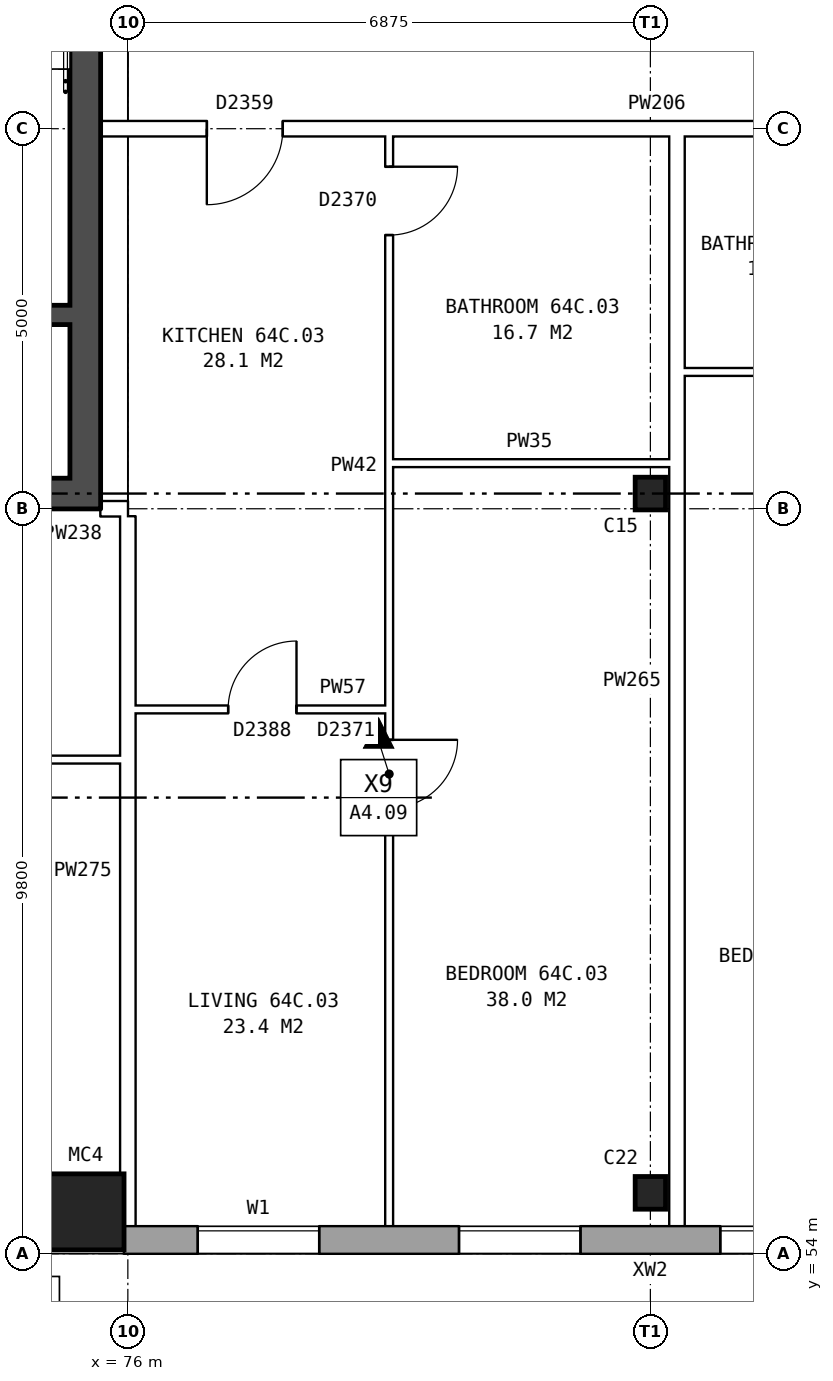
"""IFC4 building model, lengths in metres.
Left out: names, types, materials, properties, quantities, classifications, styles, units other than length and angle.
Written with IfcOpenShell. Run it as: python <this file> out.ifc"""

import sys

from ifc_helpers import new_model, si_unit, direction, frame, frame_2d, origin, origin_2d, place, context, subcontext, project, spatial, rectangle, hollow_rectangle, i_section, extrude, element, fill, save


model = new_model("IFC4")
c1 = context("Model", 3, precision=1e-05, world=origin(), true_north=direction((0.0, 1.0)))
c2 = subcontext(c1, "Body", "Model", "MODEL_VIEW")
j1 = project(units=[si_unit("LENGTHUNIT", "METRE"), si_unit("PLANEANGLEUNIT", "RADIAN")], contexts=[c1])
p1 = place(None, origin())
s1 = spatial("IfcSite", under=j1, at=p1, CompositionType="ELEMENT")
p2 = place(p1, origin())
s2 = spatial("IfcBuilding", under=s1, at=p2, CompositionType="ELEMENT")
p3 = place(p2, frame((0.0, 0.0, 227.6)))
s3 = spatial("IfcBuildingStorey", under=s2, at=p3, CompositionType="ELEMENT", Elevation=227.6)
p4 = place(p3, frame((75.45, 54.55, 0.0), z_axis=(0.0, 0.0, 1.0), x_axis=(1.0, 0.0, 0.0)))
e1 = element("IfcColumn", 1, at=p4, inside=s3, PredefinedType="COLUMN", context=c2, shape_type="SweptSolid", body=[
    extrude(hollow_rectangle(XDim=1.0, YDim=1.0, WallThickness=0.055, at=origin_2d()), origin(), (0.0, 0.0, 1.0), 3.1),
])
for number, where, z_axis, x_axis in (
    (2, (82.875, 54.8, 0.0), (0.0, 0.0, 1.0), (1.0, 0.0, 0.0)),
    (3, (82.875, 64.0, 0.0), (0.0, 0.0, 1.0), (1.0, 0.0, 0.0)),
):
    element("IfcColumn", number, at=place(p3, frame(where, z_axis=z_axis, x_axis=x_axis)), inside=s3, PredefinedType="COLUMN", context=c2, shape_type="SweptSolid", body=[
        extrude(i_section(OverallWidth=0.4, OverallDepth=0.43, WebThickness=0.04, FlangeThickness=0.04, at=origin_2d()), origin(), (0.0, 0.0, 1.0), 2.85),
    ])
p5 = place(p3, frame((75.95, 54.18, 0.0), z_axis=(0.0, 0.0, 1.0), x_axis=(1.0, 0.0, 0.0)))
e4 = element("IfcWall", 4, at=p5, inside=s3, PredefinedType="STANDARD", context=c2, shape_type="SweptSolid", body=[
    extrude(rectangle(XDim=55.1, YDim=0.36, at=frame_2d((27.55, 0.0))), origin(), (0.0, 0.0, 1.0), 2.85),
])
p6 = place(p5, frame((0.969, 0.0, 0.8)))
e5 = element("IfcOpeningElement", 5, at=p6, cuts=e4, PredefinedType="OPENING", context=c2, shape_type="SweptSolid", body=[
    extrude(rectangle(XDim=1.6, YDim=1.8, at=frame_2d((0.8, 0.9))), frame((0.0, 0.19, 0.0), z_axis=(0.0, -1.0, 0.0), x_axis=(1.0, 0.0, 0.0)), (0.0, 0.0, 1.0), 0.38),
])
p7 = place(p5, frame((4.406, 0.0, 0.8)))
e6 = element("IfcOpeningElement", 6, at=p7, cuts=e4, PredefinedType="OPENING", context=c2, shape_type="SweptSolid", body=[
    extrude(rectangle(XDim=1.6, YDim=1.8, at=frame_2d((0.8, 0.9))), frame((0.0, 0.19, 0.0), z_axis=(0.0, -1.0, 0.0), x_axis=(1.0, 0.0, 0.0)), (0.0, 0.0, 1.0), 0.38),
])
p8 = place(p5, frame((7.844, 0.0, 0.8)))
e7 = element("IfcOpeningElement", 7, at=p8, cuts=e4, PredefinedType="OPENING", context=c2, shape_type="SweptSolid", body=[
    extrude(rectangle(XDim=1.6, YDim=1.8, at=frame_2d((0.8, 0.9))), frame((0.0, 0.19, 0.0), z_axis=(0.0, -1.0, 0.0), x_axis=(1.0, 0.0, 0.0)), (0.0, 0.0, 1.0), 0.38),
])
p9 = place(p5, frame((11.281, 0.0, 0.8)))
e8 = element("IfcOpeningElement", 8, at=p9, cuts=e4, PredefinedType="OPENING", context=c2, shape_type="SweptSolid", body=[
    extrude(rectangle(XDim=1.6, YDim=1.8, at=frame_2d((0.8, 0.9))), frame((0.0, 0.19, 0.0), z_axis=(0.0, -1.0, 0.0), x_axis=(1.0, 0.0, 0.0)), (0.0, 0.0, 1.0), 0.38),
])
p10 = place(p5, frame((14.719, 0.0, 0.8)))
e9 = element("IfcOpeningElement", 9, at=p10, cuts=e4, PredefinedType="OPENING", context=c2, shape_type="SweptSolid", body=[
    extrude(rectangle(XDim=1.6, YDim=1.8, at=frame_2d((0.8, 0.9))), frame((0.0, 0.19, 0.0), z_axis=(0.0, -1.0, 0.0), x_axis=(1.0, 0.0, 0.0)), (0.0, 0.0, 1.0), 0.38),
])
p11 = place(p5, frame((18.156, 0.0, 0.8)))
e10 = element("IfcOpeningElement", 10, at=p11, cuts=e4, PredefinedType="OPENING", context=c2, shape_type="SweptSolid", body=[
    extrude(rectangle(XDim=1.6, YDim=1.8, at=frame_2d((0.8, 0.9))), frame((0.0, 0.19, 0.0), z_axis=(0.0, -1.0, 0.0), x_axis=(1.0, 0.0, 0.0)), (0.0, 0.0, 1.0), 0.38),
])
p12 = place(p5, frame((21.594, 0.0, 0.8)))
e11 = element("IfcOpeningElement", 11, at=p12, cuts=e4, PredefinedType="OPENING", context=c2, shape_type="SweptSolid", body=[
    extrude(rectangle(XDim=1.6, YDim=1.8, at=frame_2d((0.8, 0.9))), frame((0.0, 0.19, 0.0), z_axis=(0.0, -1.0, 0.0), x_axis=(1.0, 0.0, 0.0)), (0.0, 0.0, 1.0), 0.38),
])
p13 = place(p5, frame((25.031, 0.0, 0.8)))
e12 = element("IfcOpeningElement", 12, at=p13, cuts=e4, PredefinedType="OPENING", context=c2, shape_type="SweptSolid", body=[
    extrude(rectangle(XDim=1.6, YDim=1.8, at=frame_2d((0.8, 0.9))), frame((0.0, 0.19, 0.0), z_axis=(0.0, -1.0, 0.0), x_axis=(1.0, 0.0, 0.0)), (0.0, 0.0, 1.0), 0.38),
])
p14 = place(p5, frame((28.469, 0.0, 0.8)))
e13 = element("IfcOpeningElement", 13, at=p14, cuts=e4, PredefinedType="OPENING", context=c2, shape_type="SweptSolid", body=[
    extrude(rectangle(XDim=1.6, YDim=1.8, at=frame_2d((0.8, 0.9))), frame((0.0, 0.19, 0.0), z_axis=(0.0, -1.0, 0.0), x_axis=(1.0, 0.0, 0.0)), (0.0, 0.0, 1.0), 0.38),
])
p15 = place(p5, frame((31.906, 0.0, 0.8)))
e14 = element("IfcOpeningElement", 14, at=p15, cuts=e4, PredefinedType="OPENING", context=c2, shape_type="SweptSolid", body=[
    extrude(rectangle(XDim=1.6, YDim=1.8, at=frame_2d((0.8, 0.9))), frame((0.0, 0.19, 0.0), z_axis=(0.0, -1.0, 0.0), x_axis=(1.0, 0.0, 0.0)), (0.0, 0.0, 1.0), 0.38),
])
p16 = place(p5, frame((35.344, 0.0, 0.8)))
e15 = element("IfcOpeningElement", 15, at=p16, cuts=e4, PredefinedType="OPENING", context=c2, shape_type="SweptSolid", body=[
    extrude(rectangle(XDim=1.6, YDim=1.8, at=frame_2d((0.8, 0.9))), frame((0.0, 0.19, 0.0), z_axis=(0.0, -1.0, 0.0), x_axis=(1.0, 0.0, 0.0)), (0.0, 0.0, 1.0), 0.38),
])
p17 = place(p5, frame((38.781, 0.0, 0.8)))
e16 = element("IfcOpeningElement", 16, at=p17, cuts=e4, PredefinedType="OPENING", context=c2, shape_type="SweptSolid", body=[
    extrude(rectangle(XDim=1.6, YDim=1.8, at=frame_2d((0.8, 0.9))), frame((0.0, 0.19, 0.0), z_axis=(0.0, -1.0, 0.0), x_axis=(1.0, 0.0, 0.0)), (0.0, 0.0, 1.0), 0.38),
])
p18 = place(p5, frame((42.219, 0.0, 0.8)))
e17 = element("IfcOpeningElement", 17, at=p18, cuts=e4, PredefinedType="OPENING", context=c2, shape_type="SweptSolid", body=[
    extrude(rectangle(XDim=1.6, YDim=1.8, at=frame_2d((0.8, 0.9))), frame((0.0, 0.19, 0.0), z_axis=(0.0, -1.0, 0.0), x_axis=(1.0, 0.0, 0.0)), (0.0, 0.0, 1.0), 0.38),
])
p19 = place(p5, frame((45.656, 0.0, 0.8)))
e18 = element("IfcOpeningElement", 18, at=p19, cuts=e4, PredefinedType="OPENING", context=c2, shape_type="SweptSolid", body=[
    extrude(rectangle(XDim=1.6, YDim=1.8, at=frame_2d((0.8, 0.9))), frame((0.0, 0.19, 0.0), z_axis=(0.0, -1.0, 0.0), x_axis=(1.0, 0.0, 0.0)), (0.0, 0.0, 1.0), 0.38),
])
p20 = place(p5, frame((49.094, 0.0, 0.8)))
e19 = element("IfcOpeningElement", 19, at=p20, cuts=e4, PredefinedType="OPENING", context=c2, shape_type="SweptSolid", body=[
    extrude(rectangle(XDim=1.6, YDim=1.8, at=frame_2d((0.8, 0.9))), frame((0.0, 0.19, 0.0), z_axis=(0.0, -1.0, 0.0), x_axis=(1.0, 0.0, 0.0)), (0.0, 0.0, 1.0), 0.38),
])
p21 = place(p5, frame((52.531, 0.0, 0.8)))
e20 = element("IfcOpeningElement", 20, at=p21, cuts=e4, PredefinedType="OPENING", context=c2, shape_type="SweptSolid", body=[
    extrude(rectangle(XDim=1.6, YDim=1.8, at=frame_2d((0.8, 0.9))), frame((0.0, 0.19, 0.0), z_axis=(0.0, -1.0, 0.0), x_axis=(1.0, 0.0, 0.0)), (0.0, 0.0, 1.0), 0.38),
])
p22 = place(p3, frame((75.44, 63.8, 0.0), z_axis=(0.0, 0.0, 1.0), x_axis=(0.0, 1.0, 0.0)))
e21 = element("IfcWall", 21, at=p22, inside=s3, PredefinedType="SHEAR", context=c2, shape_type="SweptSolid", body=[
    extrude(rectangle(XDim=12.4, YDim=0.4, at=frame_2d((6.2, 0.0))), origin(), (0.0, 0.0, 1.0), 2.85),
])
p23 = place(p22, frame((9.8, 0.0, 0.0)))
e22 = element("IfcOpeningElement", 22, at=p23, cuts=e21, PredefinedType="OPENING", context=c2, shape_type="SweptSolid", body=[
    extrude(rectangle(XDim=1.1, YDim=2.1, at=frame_2d((0.55, 1.05))), frame((0.0, 0.21, 0.0), z_axis=(0.0, -1.0, 0.0), x_axis=(1.0, 0.0, 0.0)), (0.0, 0.0, 1.0), 0.42),
])
p24 = place(p3, frame((67.04, 64.0, 0.0), z_axis=(0.0, 0.0, 1.0), x_axis=(1.0, 0.0, 0.0)))
e23 = element("IfcWall", 23, at=p24, inside=s3, PredefinedType="SHEAR", context=c2, shape_type="SweptSolid", body=[
    extrude(rectangle(XDim=8.2, YDim=0.4, at=frame_2d((4.1, 0.0))), origin(), (0.0, 0.0, 1.0), 2.85),
])
p25 = place(p3, frame((72.165, 66.35, 0.0), z_axis=(0.0, 0.0, 1.0), x_axis=(1.0, 0.0, 0.0)))
e24 = element("IfcWall", 24, at=p25, inside=s3, PredefinedType="SHEAR", context=c2, shape_type="SweptSolid", body=[
    extrude(rectangle(XDim=3.075, YDim=0.25, at=frame_2d((1.538, 0.0))), origin(), (0.0, 0.0, 1.0), 2.85),
])
p26 = place(p3, frame((70.1, 60.5, 0.0), z_axis=(0.0, 0.0, 1.0), x_axis=(1.0, 0.0, 0.0)))
e25 = element("IfcWall", 25, at=p26, inside=s3, PredefinedType="PARTITIONING", context=c2, shape_type="SweptSolid", body=[
    extrude(rectangle(XDim=5.8, YDim=0.1, at=frame_2d((2.9, 0.0))), origin(), (0.0, 0.0, 1.0), 2.85),
])
p27 = place(p3, frame((76.1, 61.16, 0.0), z_axis=(0.0, 0.0, 1.0), x_axis=(1.0, 0.0, 0.0)))
e26 = element("IfcWall", 26, at=p27, inside=s3, PredefinedType="PARTITIONING", context=c2, shape_type="SweptSolid", body=[
    extrude(rectangle(XDim=3.338, YDim=0.1, at=frame_2d((1.669, 0.0))), origin(), (0.0, 0.0, 1.0), 2.85),
])
p28 = place(p27, frame((1.219, 0.0, 0.0)))
e27 = element("IfcOpeningElement", 27, at=p28, cuts=e26, PredefinedType="OPENING", context=c2, shape_type="SweptSolid", body=[
    extrude(rectangle(XDim=0.9, YDim=2.1, at=frame_2d((0.45, 1.05))), frame((0.0, 0.06, 0.0), z_axis=(0.0, -1.0, 0.0), x_axis=(1.0, 0.0, 0.0)), (0.0, 0.0, 1.0), 0.12),
])
p29 = place(p3, frame((75.64, 63.8, 0.0), z_axis=(0.0, 0.0, 1.0), x_axis=(1.0, 0.0, 0.0)))
e28 = element("IfcWall", 28, at=p29, inside=s3, PredefinedType="PARTITIONING", context=c2, shape_type="SweptSolid", body=[
    extrude(rectangle(XDim=0.36, YDim=0.2, at=frame_2d((0.18, 0.0))), origin(), (0.0, 0.0, 1.0), 2.85),
])
p30 = place(p3, frame((79.438, 64.4, 0.0), z_axis=(0.0, 0.0, 1.0), x_axis=(1.0, 0.0, 0.0)))
e29 = element("IfcWall", 29, at=p30, inside=s3, PredefinedType="PARTITIONING", context=c2, shape_type="SweptSolid", body=[
    extrude(rectangle(XDim=3.687, YDim=0.1, at=frame_2d((1.844, 0.0))), origin(), (0.0, 0.0, 1.0), 2.85),
])
p31 = place(p3, frame((83.325, 65.6, 0.0), z_axis=(0.0, 0.0, 1.0), x_axis=(1.0, 0.0, 0.0)))
e30 = element("IfcWall", 30, at=p31, inside=s3, PredefinedType="PARTITIONING", context=c2, shape_type="SweptSolid", body=[
    extrude(rectangle(XDim=3.337, YDim=0.1, at=frame_2d((1.668, 0.0))), origin(), (0.0, 0.0, 1.0), 2.85),
])
p32 = place(p3, frame((75.64, 68.8, 0.0), z_axis=(0.0, 0.0, 1.0), x_axis=(1.0, 0.0, 0.0)))
e31 = element("IfcWall", 31, at=p32, inside=s3, PredefinedType="PARTITIONING", context=c2, shape_type="SweptSolid", body=[
    extrude(rectangle(XDim=55.72, YDim=0.2, at=frame_2d((27.86, 0.0))), origin(), (0.0, 0.0, 1.0), 2.85),
])
p33 = place(p32, frame((1.399, 0.0, 0.0)))
e32 = element("IfcOpeningElement", 32, at=p33, cuts=e31, PredefinedType="OPENING", context=c2, shape_type="SweptSolid", body=[
    extrude(rectangle(XDim=1.0, YDim=2.1, at=frame_2d((0.5, 1.05))), frame((0.0, 0.11, 0.0), z_axis=(0.0, -1.0, 0.0), x_axis=(1.0, 0.0, 0.0)), (0.0, 0.0, 1.0), 0.22),
])
p34 = place(p32, frame((12.241, 0.0, 0.0)))
e33 = element("IfcOpeningElement", 33, at=p34, cuts=e31, PredefinedType="OPENING", context=c2, shape_type="SweptSolid", body=[
    extrude(rectangle(XDim=1.0, YDim=2.1, at=frame_2d((0.5, 1.05))), frame((0.0, 0.11, 0.0), z_axis=(0.0, -1.0, 0.0), x_axis=(1.0, 0.0, 0.0)), (0.0, 0.0, 1.0), 0.22),
])
p35 = place(p32, frame((22.553, 0.0, 0.0)))
e34 = element("IfcOpeningElement", 34, at=p35, cuts=e31, PredefinedType="OPENING", context=c2, shape_type="SweptSolid", body=[
    extrude(rectangle(XDim=1.0, YDim=2.1, at=frame_2d((0.5, 1.05))), frame((0.0, 0.11, 0.0), z_axis=(0.0, -1.0, 0.0), x_axis=(1.0, 0.0, 0.0)), (0.0, 0.0, 1.0), 0.22),
])
p36 = place(p32, frame((32.866, 0.0, 0.0)))
e35 = element("IfcOpeningElement", 35, at=p36, cuts=e31, PredefinedType="OPENING", context=c2, shape_type="SweptSolid", body=[
    extrude(rectangle(XDim=1.0, YDim=2.1, at=frame_2d((0.5, 1.05))), frame((0.0, 0.11, 0.0), z_axis=(0.0, -1.0, 0.0), x_axis=(1.0, 0.0, 0.0)), (0.0, 0.0, 1.0), 0.22),
])
p37 = place(p32, frame((36.303, 0.0, 0.0)))
e36 = element("IfcOpeningElement", 36, at=p37, cuts=e31, PredefinedType="OPENING", context=c2, shape_type="SweptSolid", body=[
    extrude(rectangle(XDim=1.0, YDim=2.1, at=frame_2d((0.5, 1.05))), frame((0.0, 0.11, 0.0), z_axis=(0.0, -1.0, 0.0), x_axis=(1.0, 0.0, 0.0)), (0.0, 0.0, 1.0), 0.22),
])
p38 = place(p32, frame((46.616, 0.0, 0.0)))
e37 = element("IfcOpeningElement", 37, at=p38, cuts=e31, PredefinedType="OPENING", context=c2, shape_type="SweptSolid", body=[
    extrude(rectangle(XDim=1.0, YDim=2.1, at=frame_2d((0.5, 1.05))), frame((0.0, 0.11, 0.0), z_axis=(0.0, -1.0, 0.0), x_axis=(1.0, 0.0, 0.0)), (0.0, 0.0, 1.0), 0.22),
])
p39 = place(p32, frame((50.053, 0.0, 0.0)))
e38 = element("IfcOpeningElement", 38, at=p39, cuts=e31, PredefinedType="OPENING", context=c2, shape_type="SweptSolid", body=[
    extrude(rectangle(XDim=1.0, YDim=2.1, at=frame_2d((0.5, 1.05))), frame((0.0, 0.11, 0.0), z_axis=(0.0, -1.0, 0.0), x_axis=(1.0, 0.0, 0.0)), (0.0, 0.0, 1.0), 0.22),
])
p40 = place(p3, frame((76.0, 54.36, 0.0), z_axis=(0.0, 0.0, 1.0), x_axis=(0.0, 1.0, 0.0)))
e39 = element("IfcWall", 39, at=p40, inside=s3, PredefinedType="PARTITIONING", context=c2, shape_type="SweptSolid", body=[
    extrude(rectangle(XDim=9.34, YDim=0.2, at=frame_2d((4.67, 0.0))), origin(), (0.0, 0.0, 1.0), 2.85),
])
p41 = place(p3, frame((79.438, 54.36, 0.0), z_axis=(0.0, 0.0, 1.0), x_axis=(0.0, 1.0, 0.0)))
e40 = element("IfcWall", 40, at=p41, inside=s3, PredefinedType="PARTITIONING", context=c2, shape_type="SweptSolid", body=[
    extrude(rectangle(XDim=14.34, YDim=0.1, at=frame_2d((7.17, 0.0))), origin(), (0.0, 0.0, 1.0), 2.85),
])
p42 = place(p41, frame((5.5, 0.0, 0.0)))
e41 = element("IfcOpeningElement", 41, at=p42, cuts=e40, PredefinedType="OPENING", context=c2, shape_type="SweptSolid", body=[
    extrude(rectangle(XDim=0.9, YDim=2.1, at=frame_2d((0.45, 1.05))), frame((0.0, 0.06, 0.0), z_axis=(0.0, -1.0, 0.0), x_axis=(1.0, 0.0, 0.0)), (0.0, 0.0, 1.0), 0.12),
])
p43 = place(p41, frame((13.04, 0.0, 0.0)))
e42 = element("IfcOpeningElement", 42, at=p43, cuts=e40, PredefinedType="OPENING", context=c2, shape_type="SweptSolid", body=[
    extrude(rectangle(XDim=0.9, YDim=2.1, at=frame_2d((0.45, 1.05))), frame((0.0, 0.06, 0.0), z_axis=(0.0, -1.0, 0.0), x_axis=(1.0, 0.0, 0.0)), (0.0, 0.0, 1.0), 0.12),
])
p44 = place(p3, frame((83.225, 54.36, 0.0), z_axis=(0.0, 0.0, 1.0), x_axis=(0.0, 1.0, 0.0)))
e43 = element("IfcWall", 43, at=p44, inside=s3, PredefinedType="PARTITIONING", context=c2, shape_type="SweptSolid", body=[
    extrude(rectangle(XDim=14.34, YDim=0.2, at=frame_2d((7.17, 0.0))), origin(), (0.0, 0.0, 1.0), 2.85),
])
p45 = place(p6, origin())
e44 = element("IfcWindow", 44, at=p45, inside=s3, PartitioningType="SINGLE_PANEL", PredefinedType="WINDOW", context=c2, shape_type="SweptSolid", body=[
    extrude(rectangle(XDim=1.6, YDim=1.8, at=frame_2d((0.8, 0.9))), frame((0.0, 0.15, 0.0), z_axis=(0.0, -1.0, 0.0), x_axis=(1.0, 0.0, 0.0)), (0.0, 0.0, 1.0), 0.06),
])
fill(e5, e44)
p46 = place(p7, origin())
e45 = element("IfcWindow", 45, at=p46, inside=s3, PartitioningType="SINGLE_PANEL", PredefinedType="WINDOW", context=c2, shape_type="SweptSolid", body=[
    extrude(rectangle(XDim=1.6, YDim=1.8, at=frame_2d((0.8, 0.9))), frame((0.0, 0.15, 0.0), z_axis=(0.0, -1.0, 0.0), x_axis=(1.0, 0.0, 0.0)), (0.0, 0.0, 1.0), 0.06),
])
fill(e6, e45)
p47 = place(p8, origin())
e46 = element("IfcWindow", 46, at=p47, inside=s3, PartitioningType="SINGLE_PANEL", PredefinedType="WINDOW", context=c2, shape_type="SweptSolid", body=[
    extrude(rectangle(XDim=1.6, YDim=1.8, at=frame_2d((0.8, 0.9))), frame((0.0, 0.15, 0.0), z_axis=(0.0, -1.0, 0.0), x_axis=(1.0, 0.0, 0.0)), (0.0, 0.0, 1.0), 0.06),
])
fill(e7, e46)
p48 = place(p42, frame((0.9, 0.0, 0.0), z_axis=(0.0, 0.0, 1.0), x_axis=(-1.0, 0.0, 0.0)))
e47 = element("IfcDoor", 47, at=p48, inside=s3, OperationType="SINGLE_SWING_LEFT", PredefinedType="DOOR", context=c2, shape_type="SweptSolid", body=[
    extrude(rectangle(XDim=0.9, YDim=2.1, at=frame_2d((0.45, 1.05))), frame((0.0, 0.025, 0.0), z_axis=(0.0, -1.0, 0.0), x_axis=(1.0, 0.0, 0.0)), (0.0, 0.0, 1.0), 0.05),
])
fill(e41, e47)
p49 = place(p33, frame((1.0, 0.0, 0.0), z_axis=(0.0, 0.0, 1.0), x_axis=(-1.0, 0.0, 0.0)))
e48 = element("IfcDoor", 48, at=p49, inside=s3, OperationType="SINGLE_SWING_RIGHT", PredefinedType="DOOR", context=c2, shape_type="SweptSolid", body=[
    extrude(rectangle(XDim=1.0, YDim=2.1, at=frame_2d((0.5, 1.05))), frame((0.0, 0.025, 0.0), z_axis=(0.0, -1.0, 0.0), x_axis=(1.0, 0.0, 0.0)), (0.0, 0.0, 1.0), 0.05),
])
fill(e32, e48)
p50 = place(p28, origin())
e49 = element("IfcDoor", 49, at=p50, inside=s3, OperationType="SINGLE_SWING_RIGHT", PredefinedType="DOOR", context=c2, shape_type="SweptSolid", body=[
    extrude(rectangle(XDim=0.9, YDim=2.1, at=frame_2d((0.45, 1.05))), frame((0.0, 0.025, 0.0), z_axis=(0.0, -1.0, 0.0), x_axis=(1.0, 0.0, 0.0)), (0.0, 0.0, 1.0), 0.05),
])
fill(e27, e49)
p51 = place(p43, frame((0.9, 0.0, 0.0), z_axis=(0.0, 0.0, 1.0), x_axis=(-1.0, 0.0, 0.0)))
e50 = element("IfcDoor", 50, at=p51, inside=s3, OperationType="SINGLE_SWING_LEFT", PredefinedType="DOOR", context=c2, shape_type="SweptSolid", body=[
    extrude(rectangle(XDim=0.9, YDim=2.1, at=frame_2d((0.45, 1.05))), frame((0.0, 0.025, 0.0), z_axis=(0.0, -1.0, 0.0), x_axis=(1.0, 0.0, 0.0)), (0.0, 0.0, 1.0), 0.05),
])
fill(e42, e50)
save(model, sys.argv[1])
